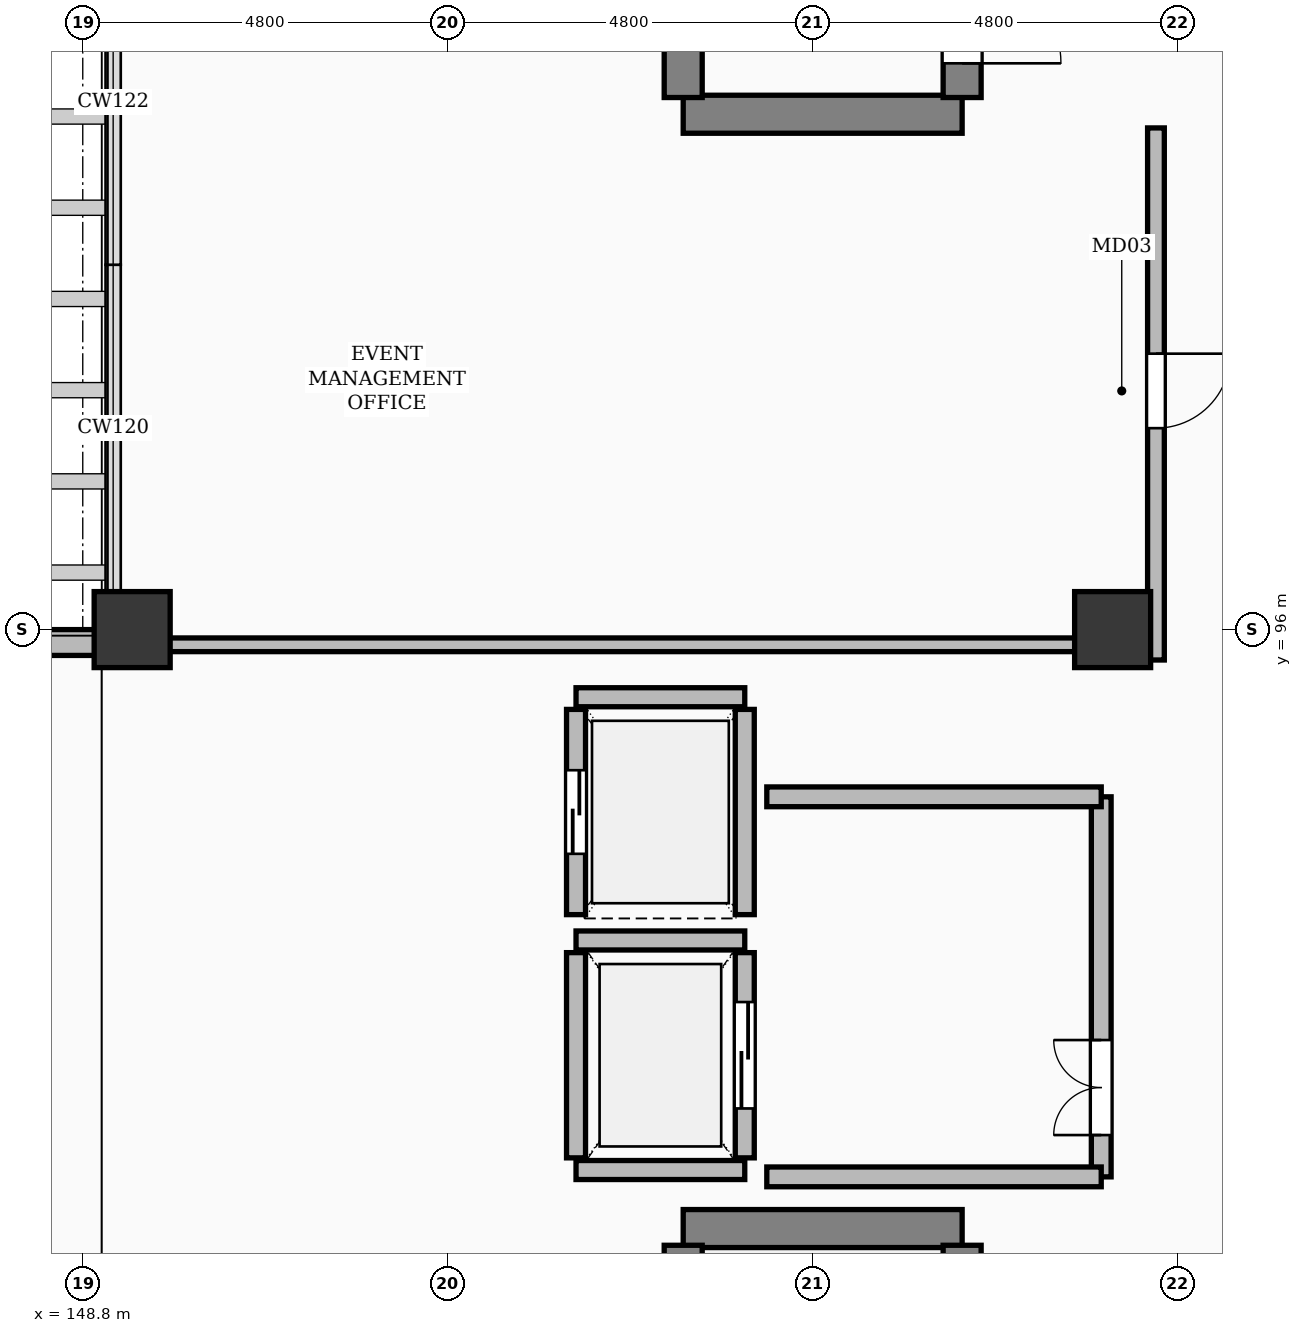
"""IFC4 building model, lengths in metres.
Left out: names, types, materials, properties, quantities, classifications, styles, units other than length and angle.
Written with IfcOpenShell. Run it as: python <this file> out.ifc"""

import sys

from ifc_helpers import new_model, si_unit, direction, frame, frame_2d, origin, origin_2d, place, context, subcontext, project, spatial, rectangle, extrude, element, fill, save


model = new_model("IFC4")
c1 = context("Model", 3, precision=1e-05, world=origin(), true_north=direction((0.0, 1.0)))
c2 = subcontext(c1, "Body", "Model", "MODEL_VIEW")
j1 = project(units=[si_unit("LENGTHUNIT", "METRE"), si_unit("PLANEANGLEUNIT", "RADIAN")], contexts=[c1])
p1 = place(None, origin())
s1 = spatial("IfcSite", under=j1, at=p1, CompositionType="ELEMENT")
p2 = place(p1, origin())
s2 = spatial("IfcBuilding", under=s1, at=p2, CompositionType="ELEMENT")
p3 = place(p2, frame((0.0, 0.0, 6.0)))
s3 = spatial("IfcBuildingStorey", under=s2, at=p3, CompositionType="ELEMENT", Elevation=6.0)
for number, where, z_axis, x_axis in (
    (1, (149.45, 96.0, 0.0), (0.0, 0.0, 1.0), (1.0, 0.0, 0.0)),
    (2, (162.35, 96.0, 0.0), (0.0, 0.0, 1.0), (1.0, 0.0, 0.0)),
):
    element("IfcColumn", number, at=place(p3, frame(where, z_axis=z_axis, x_axis=x_axis)), inside=s3, PredefinedType="COLUMN", context=c2, shape_type="SweptSolid", body=[
        extrude(rectangle(XDim=1.0, YDim=1.0, at=origin_2d()), origin(), (0.0, 0.0, 1.0), 5.4),
    ])
p4 = place(p3, frame((144.365, 95.83, 0.0), z_axis=(0.0, 0.0, 1.0), x_axis=(1.0, 0.0, 0.0)))
e3 = element("IfcWall", 3, at=p4, inside=s3, PredefinedType="SOLIDWALL", context=c2, shape_type="SweptSolid", body=[
    extrude(rectangle(XDim=4.61, YDim=0.34, at=frame_2d((2.305, 0.0))), origin(), (0.0, 0.0, 1.0), 5.1),
])
p5 = place(p3, frame((156.7, 88.12, 0.0), z_axis=(0.0, 0.0, 1.0), x_axis=(1.0, 0.0, 0.0)))
e4 = element("IfcWall", 4, at=p5, inside=s3, PredefinedType="SHEAR", context=c2, shape_type="SweptSolid", body=[
    extrude(rectangle(XDim=3.67, YDim=0.5, at=frame_2d((1.835, 0.0))), origin(), (0.0, 0.0, 1.0), 5.1),
])
p6 = place(p3, frame((156.7, 77.4, 0.0), z_axis=(0.0, 0.0, 1.0), x_axis=(0.0, 1.0, 0.0)))
e5 = element("IfcWall", 5, at=p6, inside=s3, PredefinedType="SHEAR", context=c2, shape_type="SweptSolid", body=[
    extrude(rectangle(XDim=10.5, YDim=0.5, at=frame_2d((5.25, 0.0))), origin(), (0.0, 0.0, 1.0), 5.1),
])
p7 = place(p3, frame((160.37, 77.4, 0.0), z_axis=(0.0, 0.0, 1.0), x_axis=(0.0, 1.0, 0.0)))
e6 = element("IfcWall", 6, at=p7, inside=s3, PredefinedType="SHEAR", context=c2, shape_type="SweptSolid", body=[
    extrude(rectangle(XDim=10.5, YDim=0.5, at=frame_2d((5.25, 0.0))), origin(), (0.0, 0.0, 1.0), 5.1),
])
p8 = place(p7, frame((0.45, 0.0, 0.0)))
e7 = element("IfcOpeningElement", 7, at=p8, cuts=e6, PredefinedType="OPENING", context=c2, shape_type="SweptSolid", body=[
    extrude(rectangle(XDim=1.3, YDim=2.15, at=frame_2d((0.65, 1.075))), frame((0.0, 0.262, 0.0), z_axis=(0.0, -1.0, 0.0), x_axis=(1.0, 0.0, 0.0)), (0.0, 0.0, 1.0), 0.524),
])
for number, where, z_axis, x_axis in (
    (8, (155.29, 88.89, 0.0), (0.0, 0.0, 1.0), (1.0, 0.0, 0.0)),
    (9, (155.29, 91.91, 0.0), (0.0, 0.0, 1.0), (1.0, 0.0, 0.0)),
):
    element("IfcWall", number, at=place(p3, frame(where, z_axis=z_axis, x_axis=x_axis)), inside=s3, PredefinedType="SOLIDWALL", context=c2, shape_type="SweptSolid", body=[
        extrude(rectangle(XDim=2.22, YDim=0.25, at=frame_2d((1.11, 0.0))), origin(), (0.0, 0.0, 1.0), 5.1),
    ])
p9 = place(p3, frame((155.29, 89.05, 0.0), z_axis=(0.0, 0.0, 1.0), x_axis=(0.0, 1.0, 0.0)))
e10 = element("IfcWall", 10, at=p9, inside=s3, PredefinedType="SOLIDWALL", context=c2, shape_type="SweptSolid", body=[
    extrude(rectangle(XDim=2.7, YDim=0.25, at=frame_2d((1.35, 0.0))), origin(), (0.0, 0.0, 1.0), 5.1),
])
p10 = place(p3, frame((157.51, 89.05, 0.0), z_axis=(0.0, 0.0, 1.0), x_axis=(0.0, 1.0, 0.0)))
e11 = element("IfcWall", 11, at=p10, inside=s3, PredefinedType="SOLIDWALL", context=c2, shape_type="SweptSolid", body=[
    extrude(rectangle(XDim=2.7, YDim=0.25, at=frame_2d((1.35, 0.0))), origin(), (0.0, 0.0, 1.0), 5.1),
])
p11 = place(p10, frame((0.65, 0.0, 0.0)))
e12 = element("IfcOpeningElement", 12, at=p11, cuts=e11, PredefinedType="OPENING", context=c2, shape_type="SweptSolid", body=[
    extrude(rectangle(XDim=1.4, YDim=2.3, at=frame_2d((0.7, 1.15))), frame((0.0, 0.137, 0.0), z_axis=(0.0, -1.0, 0.0), x_axis=(1.0, 0.0, 0.0)), (0.0, 0.0, 1.0), 0.274),
])
p12 = place(p3, frame((155.29, 95.11, 0.0), z_axis=(0.0, 0.0, 1.0), x_axis=(1.0, 0.0, 0.0)))
e13 = element("IfcWall", 13, at=p12, inside=s3, PredefinedType="SOLIDWALL", context=c2, shape_type="SweptSolid", body=[
    extrude(rectangle(XDim=2.22, YDim=0.25, at=frame_2d((1.11, 0.0))), origin(), (0.0, 0.0, 1.0), 5.1),
])
p13 = place(p3, frame((155.29, 92.25, 0.0), z_axis=(0.0, 0.0, 1.0), x_axis=(0.0, 1.0, 0.0)))
e14 = element("IfcWall", 14, at=p13, inside=s3, PredefinedType="SOLIDWALL", context=c2, shape_type="SweptSolid", body=[
    extrude(rectangle(XDim=2.7, YDim=0.25, at=frame_2d((1.35, 0.0))), origin(), (0.0, 0.0, 1.0), 5.1),
])
p14 = place(p13, frame((0.8, 0.0, 0.0)))
e15 = element("IfcOpeningElement", 15, at=p14, cuts=e14, PredefinedType="OPENING", context=c2, shape_type="SweptSolid", body=[
    extrude(rectangle(XDim=1.1, YDim=2.2, at=frame_2d((0.55, 1.1))), frame((0.0, 0.137, 0.0), z_axis=(0.0, -1.0, 0.0), x_axis=(1.0, 0.0, 0.0)), (0.0, 0.0, 1.0), 0.274),
])
p15 = place(p3, frame((157.51, 92.25, 0.0), z_axis=(0.0, 0.0, 1.0), x_axis=(0.0, 1.0, 0.0)))
e16 = element("IfcWall", 16, at=p15, inside=s3, PredefinedType="SOLIDWALL", context=c2, shape_type="SweptSolid", body=[
    extrude(rectangle(XDim=2.7, YDim=0.25, at=frame_2d((1.35, 0.0))), origin(), (0.0, 0.0, 1.0), 5.1),
])
p16 = place(p3, frame((162.2, 88.8, 0.0), z_axis=(0.0, 0.0, 1.0), x_axis=(0.0, 1.0, 0.0)))
e17 = element("IfcWall", 17, at=p16, inside=s3, PredefinedType="SOLIDWALL", context=c2, shape_type="SweptSolid", body=[
    extrude(rectangle(XDim=5.0, YDim=0.26, at=frame_2d((2.5, 0.0))), origin(), (0.0, 0.0, 1.0), 4.312),
])
p17 = place(p16, frame((0.55, 0.0, 0.0)))
e18 = element("IfcOpeningElement", 18, at=p17, cuts=e17, PredefinedType="OPENING", context=c2, shape_type="SweptSolid", body=[
    extrude(rectangle(XDim=1.25, YDim=2.15, at=frame_2d((0.625, 1.075))), frame((0.0, 0.142, 0.0), z_axis=(0.0, -1.0, 0.0), x_axis=(1.0, 0.0, 0.0)), (0.0, 0.0, 1.0), 0.284),
])
for number, where, z_axis, x_axis in (
    (19, (157.8, 88.8, 0.0), (0.0, 0.0, 1.0), (1.0, 0.0, 0.0)),
    (20, (157.8, 93.8, 0.0), (0.0, 0.0, 1.0), (1.0, 0.0, 0.0)),
):
    element("IfcWall", number, at=place(p3, frame(where, z_axis=z_axis, x_axis=x_axis)), inside=s3, PredefinedType="SOLIDWALL", context=c2, shape_type="SweptSolid", body=[
        extrude(rectangle(XDim=4.4, YDim=0.26, at=frame_2d((2.2, 0.0))), origin(), (0.0, 0.0, 1.0), 4.312),
    ])
p18 = place(p3, frame((156.7, 102.78, 0.0), z_axis=(0.0, 0.0, 1.0), x_axis=(1.0, 0.0, 0.0)))
e21 = element("IfcWall", 21, at=p18, inside=s3, PredefinedType="SHEAR", context=c2, shape_type="SweptSolid", body=[
    extrude(rectangle(XDim=3.67, YDim=0.5, at=frame_2d((1.835, 0.0))), origin(), (0.0, 0.0, 1.0), 5.1),
])
p19 = place(p3, frame((156.7, 103.0, 0.0), z_axis=(0.0, 0.0, 1.0), x_axis=(0.0, 1.0, 0.0)))
e22 = element("IfcWall", 22, at=p19, inside=s3, PredefinedType="SHEAR", context=c2, shape_type="SweptSolid", body=[
    extrude(rectangle(XDim=10.5, YDim=0.5, at=frame_2d((5.25, 0.0))), origin(), (0.0, 0.0, 1.0), 5.1),
])
p20 = place(p3, frame((160.37, 103.0, 0.0), z_axis=(0.0, 0.0, 1.0), x_axis=(0.0, 1.0, 0.0)))
e23 = element("IfcWall", 23, at=p20, inside=s3, PredefinedType="SHEAR", context=c2, shape_type="SweptSolid", body=[
    extrude(rectangle(XDim=10.5, YDim=0.5, at=frame_2d((5.25, 0.0))), origin(), (0.0, 0.0, 1.0), 5.1),
])
p21 = place(p20, frame((0.45, 0.0, 0.0)))
e24 = element("IfcOpeningElement", 24, at=p21, cuts=e23, PredefinedType="OPENING", context=c2, shape_type="SweptSolid", body=[
    extrude(rectangle(XDim=1.3, YDim=2.15, at=frame_2d((0.65, 1.075))), frame((0.0, 0.262, 0.0), z_axis=(0.0, -1.0, 0.0), x_axis=(1.0, 0.0, 0.0)), (0.0, 0.0, 1.0), 0.524),
])
p22 = place(p3, frame((162.92, 95.6, 0.0), z_axis=(0.0, 0.0, 1.0), x_axis=(0.0, 1.0, 0.0)))
e25 = element("IfcWall", 25, at=p22, inside=s3, PredefinedType="PARTITIONING", context=c2, shape_type="SweptSolid", body=[
    extrude(rectangle(XDim=7.0, YDim=0.22, at=frame_2d((3.5, 0.0))), origin(), (0.0, 0.0, 1.0), 4.312),
])
p23 = place(p22, frame((3.05, 0.0, 0.0)))
e26 = element("IfcOpeningElement", 26, at=p23, cuts=e25, PredefinedType="OPENING", context=c2, shape_type="SweptSolid", body=[
    extrude(rectangle(XDim=0.98, YDim=2.15, at=frame_2d((0.49, 1.075))), frame((0.0, 0.122, 0.0), z_axis=(0.0, -1.0, 0.0), x_axis=(1.0, 0.0, 0.0)), (0.0, 0.0, 1.0), 0.244),
])
p24 = place(p3, frame((149.5, 95.8, 0.0), z_axis=(0.0, 0.0, 1.0), x_axis=(1.0, 0.0, 0.0)))
e27 = element("IfcWall", 27, at=p24, inside=s3, PredefinedType="PARTITIONING", context=c2, shape_type="SweptSolid", body=[
    extrude(rectangle(XDim=13.2, YDim=0.18, at=frame_2d((6.6, 0.0))), origin(), (0.0, 0.0, 1.0), 4.312),
])
p25 = place(p11, origin())
e28 = element("IfcDoor", 28, at=p25, inside=s3, OperationType="SLIDING_TO_LEFT", PredefinedType="DOOR", context=c2, shape_type="SweptSolid", body=[
    extrude(rectangle(XDim=1.4, YDim=2.3, at=frame_2d((0.7, 1.15))), frame((0.0, 0.025, 0.0), z_axis=(0.0, -1.0, 0.0), x_axis=(1.0, 0.0, 0.0)), (0.0, 0.0, 1.0), 0.05),
])
fill(e12, e28)
p26 = place(p14, origin())
e29 = element("IfcDoor", 29, at=p26, inside=s3, OperationType="SLIDING_TO_LEFT", PredefinedType="DOOR", context=c2, shape_type="SweptSolid", body=[
    extrude(rectangle(XDim=1.1, YDim=2.2, at=frame_2d((0.55, 1.1))), frame((0.0, 0.025, 0.0), z_axis=(0.0, -1.0, 0.0), x_axis=(1.0, 0.0, 0.0)), (0.0, 0.0, 1.0), 0.05),
])
fill(e15, e29)
p27 = place(p17, origin())
e30 = element("IfcDoor", 30, at=p27, inside=s3, OperationType="DOUBLE_DOOR_SINGLE_SWING", PredefinedType="DOOR", context=c2, shape_type="SweptSolid", body=[
    extrude(rectangle(XDim=1.25, YDim=2.15, at=frame_2d((0.625, 1.075))), frame((0.0, 0.025, 0.0), z_axis=(0.0, -1.0, 0.0), x_axis=(1.0, 0.0, 0.0)), (0.0, 0.0, 1.0), 0.05),
])
fill(e18, e30)
p28 = place(p21, frame((1.3, 0.0, 0.0), z_axis=(0.0, 0.0, 1.0), x_axis=(-1.0, 0.0, 0.0)))
e31 = element("IfcDoor", 31, at=p28, inside=s3, OperationType="SINGLE_SWING_LEFT", PredefinedType="DOOR", context=c2, shape_type="SweptSolid", body=[
    extrude(rectangle(XDim=1.3, YDim=2.15, at=frame_2d((0.65, 1.075))), frame((0.0, 0.025, 0.0), z_axis=(0.0, -1.0, 0.0), x_axis=(1.0, 0.0, 0.0)), (0.0, 0.0, 1.0), 0.05),
])
fill(e24, e31)
p29 = place(p23, frame((0.98, 0.0, 0.0), z_axis=(0.0, 0.0, 1.0), x_axis=(-1.0, 0.0, 0.0)))
e32 = element("IfcDoor", 32, at=p29, inside=s3, OperationType="SINGLE_SWING_RIGHT", PredefinedType="DOOR", context=c2, shape_type="SweptSolid", body=[
    extrude(rectangle(XDim=0.98, YDim=2.15, at=frame_2d((0.49, 1.075))), frame((0.0, 0.025, 0.0), z_axis=(0.0, -1.0, 0.0), x_axis=(1.0, 0.0, 0.0)), (0.0, 0.0, 1.0), 0.05),
])
fill(e26, e32)
save(model, sys.argv[1])
